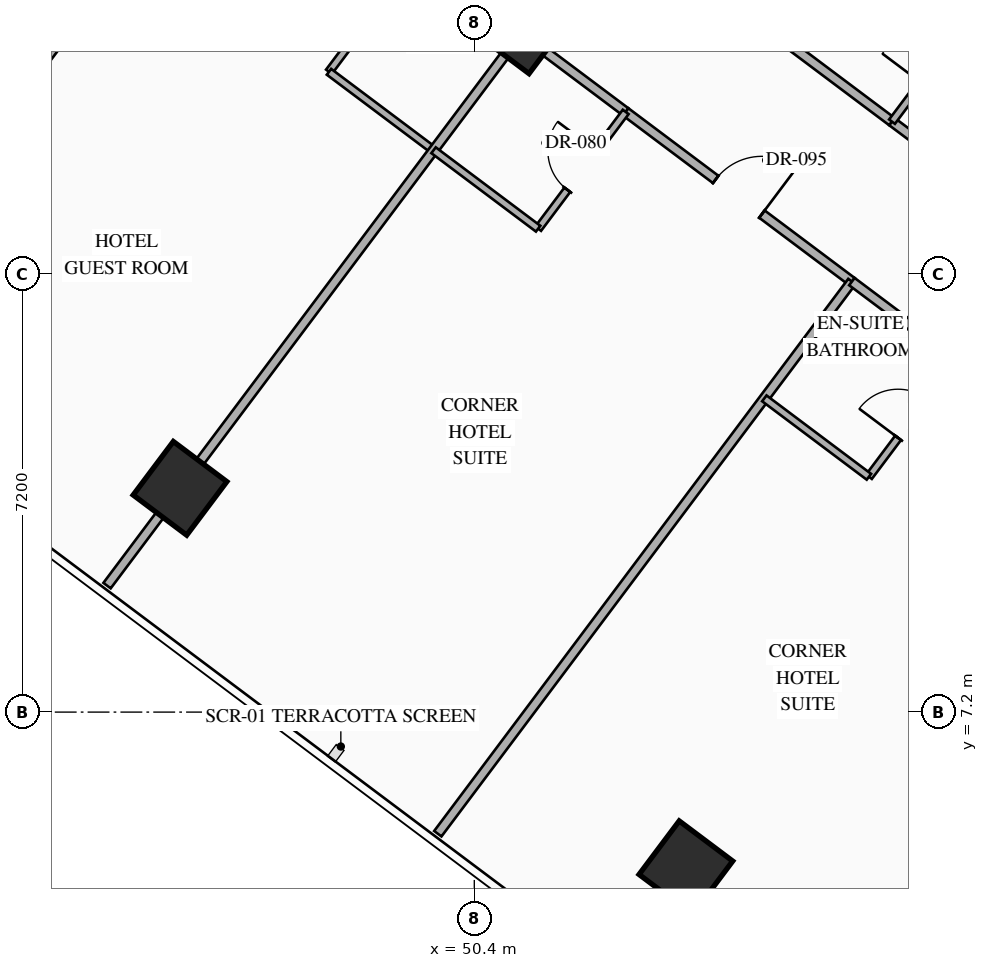
"""IFC4 building model, lengths in metres.
Left out: names, types, materials, properties, quantities, classifications, styles, units other than length and angle.
Written with IfcOpenShell. Run it as: python <this file> out.ifc"""

import sys

from ifc_helpers import new_model, si_unit, direction, frame, frame_2d, origin, origin_2d, place, context, subcontext, project, spatial, rectangle, hollow_rectangle, extrude, element, fill, save


model = new_model("IFC4")
c1 = context("Model", 3, precision=1e-05, world=origin(), true_north=direction((0.0, 1.0)))
c2 = subcontext(c1, "Body", "Model", "MODEL_VIEW")
j1 = project(units=[si_unit("LENGTHUNIT", "METRE"), si_unit("PLANEANGLEUNIT", "RADIAN")], contexts=[c1])
p1 = place(None, origin())
s1 = spatial("IfcSite", under=j1, at=p1, CompositionType="ELEMENT")
p2 = place(p1, origin())
s2 = spatial("IfcBuilding", under=s1, at=p2, CompositionType="ELEMENT")
p3 = place(p2, frame((0.0, 0.0, 63.4)))
s3 = spatial("IfcBuildingStorey", under=s2, at=p3, CompositionType="ELEMENT", Elevation=63.4)
p4 = place(p3, frame((45.56, 10.88, 0.0), z_axis=(0.0, 0.0, 1.0), x_axis=(0.799999996291, -0.600000004945, 0.0)))
e1 = element("IfcColumn", 1, at=p4, inside=s3, PredefinedType="COLUMN", context=c2, shape_type="SweptSolid", body=[
    extrude(hollow_rectangle(XDim=1.1, YDim=1.1, WallThickness=0.04, at=origin_2d()), origin(), (0.0, 0.0, 1.0), 3.35),
])
p5 = place(p3, frame((51.2, 18.4, 0.0), z_axis=(0.0, 0.0, 1.0), x_axis=(0.799999996291, -0.600000004945, 0.0)))
e2 = element("IfcColumn", 2, at=p5, inside=s3, PredefinedType="COLUMN", context=c2, shape_type="SweptSolid", body=[
    extrude(hollow_rectangle(XDim=1.0, YDim=1.0, WallThickness=0.038, at=origin_2d()), origin(), (0.0, 0.0, 1.0), 3.35),
])
p6 = place(p3, frame((53.88, 4.64, 0.0), z_axis=(0.0, 0.0, 1.0), x_axis=(0.799999996291, -0.600000004945, 0.0)))
e3 = element("IfcColumn", 3, at=p6, inside=s3, PredefinedType="COLUMN", context=c2, shape_type="SweptSolid", body=[
    extrude(hollow_rectangle(XDim=1.1, YDim=1.1, WallThickness=0.04, at=origin_2d()), origin(), (0.0, 0.0, 1.0), 3.35),
])
p7 = place(p3, frame((39.464, 12.752, 0.0), z_axis=(0.0, 0.0, 1.0), x_axis=(0.6, 0.8, 0.0)))
e4 = element("IfcWall", 4, at=p7, inside=s3, PredefinedType="PARTITIONING", context=c2, shape_type="SweptSolid", body=[
    extrude(rectangle(XDim=11.51, YDim=0.15, at=frame_2d((5.755, 0.0))), origin(), (0.0, 0.0, 1.0), 3.13),
])
p8 = place(p3, frame((55.55, 18.2, 0.0), z_axis=(0.0, 0.0, 1.0), x_axis=(0.79998637334, -0.60001816845, 0.0)))
e5 = element("IfcWall", 5, at=p8, inside=s3, PredefinedType="PARTITIONING", context=c2, shape_type="SweptSolid", body=[
    extrude(rectangle(XDim=2.15, YDim=0.15, at=frame_2d((1.075, 0.0))), origin(), (0.0, 0.0, 1.0), 2.775),
])
p9 = place(p3, frame((57.27, 16.91, 0.0), z_axis=(0.0, 0.0, 1.0), x_axis=(0.800010279488, -0.599986293772, 0.0)))
e6 = element("IfcWall", 6, at=p9, inside=s3, PredefinedType="PARTITIONING", context=c2, shape_type="SweptSolid", body=[
    extrude(rectangle(XDim=2.85, YDim=0.15, at=frame_2d((1.425, 0.0))), origin(), (0.0, 0.0, 1.0), 2.775),
])
p10 = place(p9, frame((0.95, 0.0, 0.0)))
e7 = element("IfcOpeningElement", 7, at=p10, cuts=e6, PredefinedType="OPENING", context=c2, shape_type="SweptSolid", body=[
    extrude(rectangle(XDim=0.95, YDim=2.15, at=frame_2d((0.475, 1.075))), frame((0.0, 0.085, 0.0), z_axis=(0.0, -1.0, 0.0), x_axis=(1.0, 0.0, 0.0)), (0.0, 0.0, 1.0), 0.17),
])
p11 = place(p3, frame((57.27, 16.91, 0.0), z_axis=(0.0, 0.0, 1.0), x_axis=(0.599951172744, 0.800036618114, 0.0)))
e8 = element("IfcWall", 8, at=p11, inside=s3, PredefinedType="PARTITIONING", context=c2, shape_type="SweptSolid", body=[
    extrude(rectangle(XDim=2.4, YDim=0.12, at=frame_2d((1.2, 0.0))), origin(), (0.0, 0.0, 1.0), 3.13),
])
p12 = place(p11, frame((0.8, 0.0, 0.0)))
e9 = element("IfcOpeningElement", 9, at=p12, cuts=e8, PredefinedType="OPENING", context=c2, shape_type="SweptSolid", body=[
    extrude(rectangle(XDim=0.8, YDim=2.06, at=frame_2d((0.4, 1.03))), frame((0.0, 0.07, 0.0), z_axis=(0.0, -1.0, 0.0), x_axis=(1.0, 0.0, 0.0)), (0.0, 0.0, 1.0), 0.14),
])
p13 = place(p3, frame((48.01, 17.73, 0.0), z_axis=(0.0, 0.0, 1.0), x_axis=(0.6, 0.8, 0.0)))
e10 = element("IfcWall", 10, at=p13, inside=s3, PredefinedType="PARTITIONING", context=c2, shape_type="SweptSolid", body=[
    extrude(rectangle(XDim=2.4, YDim=0.12, at=frame_2d((1.2, 0.0))), origin(), (0.0, 0.0, 1.0), 3.13),
])
p14 = place(p13, frame((0.8, 0.0, 0.0)))
e11 = element("IfcOpeningElement", 11, at=p14, cuts=e10, PredefinedType="OPENING", context=c2, shape_type="SweptSolid", body=[
    extrude(rectangle(XDim=0.8, YDim=2.06, at=frame_2d((0.4, 1.03))), frame((0.0, 0.07, 0.0), z_axis=(0.0, -1.0, 0.0), x_axis=(1.0, 0.0, 0.0)), (0.0, 0.0, 1.0), 0.14),
])
p15 = place(p3, frame((48.01, 17.73, 0.0), z_axis=(0.0, 0.0, 1.0), x_axis=(0.79998637334, -0.60001816845, 0.0)))
e12 = element("IfcWall", 12, at=p15, inside=s3, PredefinedType="PARTITIONING", context=c2, shape_type="SweptSolid", body=[
    extrude(rectangle(XDim=2.15, YDim=0.12, at=frame_2d((1.075, 0.0))), origin(), (0.0, 0.0, 1.0), 3.13),
])
p16 = place(p3, frame((44.36, 9.28, 0.0), z_axis=(0.0, 0.0, 1.0), x_axis=(0.599986233332, 0.800010324816, 0.0)))
e13 = element("IfcWall", 13, at=p16, inside=s3, PredefinedType="PARTITIONING", context=c2, shape_type="SweptSolid", body=[
    extrude(rectangle(XDim=11.35, YDim=0.15, at=frame_2d((5.675, 0.0))), origin(), (0.0, 0.0, 1.0), 2.425),
])
p17 = place(p3, frame((51.17, 18.36, 0.0), z_axis=(0.0, 0.0, 1.0), x_axis=(0.79998637334, -0.60001816845, 0.0)))
e14 = element("IfcWall", 14, at=p17, inside=s3, PredefinedType="PARTITIONING", context=c2, shape_type="SweptSolid", body=[
    extrude(rectangle(XDim=2.15, YDim=0.15, at=frame_2d((1.075, 0.0))), origin(), (0.0, 0.0, 1.0), 2.425),
])
p18 = place(p3, frame((52.89, 17.07, 0.0), z_axis=(0.0, 0.0, 1.0), x_axis=(0.800012600101, -0.599983199498, 0.0)))
e15 = element("IfcWall", 15, at=p18, inside=s3, PredefinedType="PARTITIONING", context=c2, shape_type="SweptSolid", body=[
    extrude(rectangle(XDim=4.65, YDim=0.15, at=frame_2d((2.325, 0.0))), origin(), (0.0, 0.0, 1.0), 2.425),
])
p19 = place(p18, frame((1.85, 0.0, 0.0)))
e16 = element("IfcOpeningElement", 16, at=p19, cuts=e15, PredefinedType="OPENING", context=c2, shape_type="SweptSolid", body=[
    extrude(rectangle(XDim=0.95, YDim=2.15, at=frame_2d((0.475, 1.075))), frame((0.0, 0.085, 0.0), z_axis=(0.0, -1.0, 0.0), x_axis=(1.0, 0.0, 0.0)), (0.0, 0.0, 1.0), 0.17),
])
p20 = place(p3, frame((51.45, 15.15, 0.0), z_axis=(0.0, 0.0, 1.0), x_axis=(0.599951172744, 0.800036618114, 0.0)))
e17 = element("IfcWall", 17, at=p20, inside=s3, PredefinedType="PARTITIONING", context=c2, shape_type="SweptSolid", body=[
    extrude(rectangle(XDim=2.4, YDim=0.12, at=frame_2d((1.2, 0.0))), origin(), (0.0, 0.0, 1.0), 3.13),
])
p21 = place(p20, frame((0.8, 0.0, 0.0)))
e18 = element("IfcOpeningElement", 18, at=p21, cuts=e17, PredefinedType="OPENING", context=c2, shape_type="SweptSolid", body=[
    extrude(rectangle(XDim=0.8, YDim=2.06, at=frame_2d((0.4, 1.03))), frame((0.0, 0.07, 0.0), z_axis=(0.0, -1.0, 0.0), x_axis=(1.0, 0.0, 0.0)), (0.0, 0.0, 1.0), 0.14),
])
p22 = place(p3, frame((49.73, 16.44, 0.0), z_axis=(0.0, 0.0, 1.0), x_axis=(0.79998637334, -0.60001816845, 0.0)))
e19 = element("IfcWall", 19, at=p22, inside=s3, PredefinedType="PARTITIONING", context=c2, shape_type="SweptSolid", body=[
    extrude(rectangle(XDim=2.15, YDim=0.12, at=frame_2d((1.075, 0.0))), origin(), (0.0, 0.0, 1.0), 3.13),
])
p23 = place(p3, frame((49.8, 5.2, 0.0), z_axis=(0.0, 0.0, 1.0), x_axis=(0.6, 0.8, 0.0)))
e20 = element("IfcWall", 20, at=p23, inside=s3, PredefinedType="PARTITIONING", context=c2, shape_type="SweptSolid", body=[
    extrude(rectangle(XDim=11.35, YDim=0.15, at=frame_2d((5.675, 0.0))), origin(), (0.0, 0.0, 1.0), 3.13),
])
p24 = place(p3, frame((56.61, 14.28, 0.0), z_axis=(0.0, 0.0, 1.0), x_axis=(0.79998637334, -0.60001816845, 0.0)))
e21 = element("IfcWall", 21, at=p24, inside=s3, PredefinedType="PARTITIONING", context=c2, shape_type="SweptSolid", body=[
    extrude(rectangle(XDim=2.15, YDim=0.15, at=frame_2d((1.075, 0.0))), origin(), (0.0, 0.0, 1.0), 2.425),
])
p25 = place(p3, frame((56.89, 11.07, 0.0), z_axis=(0.0, 0.0, 1.0), x_axis=(0.600065100855, 0.79995117022, 0.0)))
e22 = element("IfcWall", 22, at=p25, inside=s3, PredefinedType="PARTITIONING", context=c2, shape_type="SweptSolid", body=[
    extrude(rectangle(XDim=2.4, YDim=0.12, at=frame_2d((1.2, 0.0))), origin(), (0.0, 0.0, 1.0), 3.13),
])
p26 = place(p25, frame((0.8, 0.0, 0.0)))
e23 = element("IfcOpeningElement", 23, at=p26, cuts=e22, PredefinedType="OPENING", context=c2, shape_type="SweptSolid", body=[
    extrude(rectangle(XDim=0.8, YDim=2.06, at=frame_2d((0.4, 1.03))), frame((0.0, 0.07, 0.0), z_axis=(0.0, -1.0, 0.0), x_axis=(1.0, 0.0, 0.0)), (0.0, 0.0, 1.0), 0.14),
])
p27 = place(p3, frame((55.17, 12.36, 0.0), z_axis=(0.0, 0.0, 1.0), x_axis=(0.79998637334, -0.60001816845, 0.0)))
e24 = element("IfcWall", 24, at=p27, inside=s3, PredefinedType="PARTITIONING", context=c2, shape_type="SweptSolid", body=[
    extrude(rectangle(XDim=2.15, YDim=0.12, at=frame_2d((1.075, 0.0))), origin(), (0.0, 0.0, 1.0), 3.13),
])
p28 = place(p19, origin())
e25 = element("IfcDoor", 25, at=p28, inside=s3, OperationType="SINGLE_SWING_RIGHT", PredefinedType="DOOR", context=c2, shape_type="SweptSolid", body=[
    extrude(rectangle(XDim=0.95, YDim=2.15, at=frame_2d((0.475, 1.075))), frame((0.0, 0.025, 0.0), z_axis=(0.0, -1.0, 0.0), x_axis=(1.0, 0.0, 0.0)), (0.0, 0.0, 1.0), 0.05),
])
fill(e16, e25)
p29 = place(p21, origin())
e26 = element("IfcDoor", 26, at=p29, inside=s3, OperationType="SINGLE_SWING_RIGHT", PredefinedType="DOOR", context=c2, shape_type="SweptSolid", body=[
    extrude(rectangle(XDim=0.8, YDim=2.06, at=frame_2d((0.4, 1.03))), frame((0.0, 0.025, 0.0), z_axis=(0.0, -1.0, 0.0), x_axis=(1.0, 0.0, 0.0)), (0.0, 0.0, 1.0), 0.05),
])
fill(e18, e26)
p30 = place(p26, origin())
e27 = element("IfcDoor", 27, at=p30, inside=s3, OperationType="SINGLE_SWING_LEFT", PredefinedType="DOOR", context=c2, shape_type="SweptSolid", body=[
    extrude(rectangle(XDim=0.8, YDim=2.06, at=frame_2d((0.4, 1.03))), frame((0.0, 0.025, 0.0), z_axis=(0.0, -1.0, 0.0), x_axis=(1.0, 0.0, 0.0)), (0.0, 0.0, 1.0), 0.05),
])
fill(e23, e27)
save(model, sys.argv[1])
